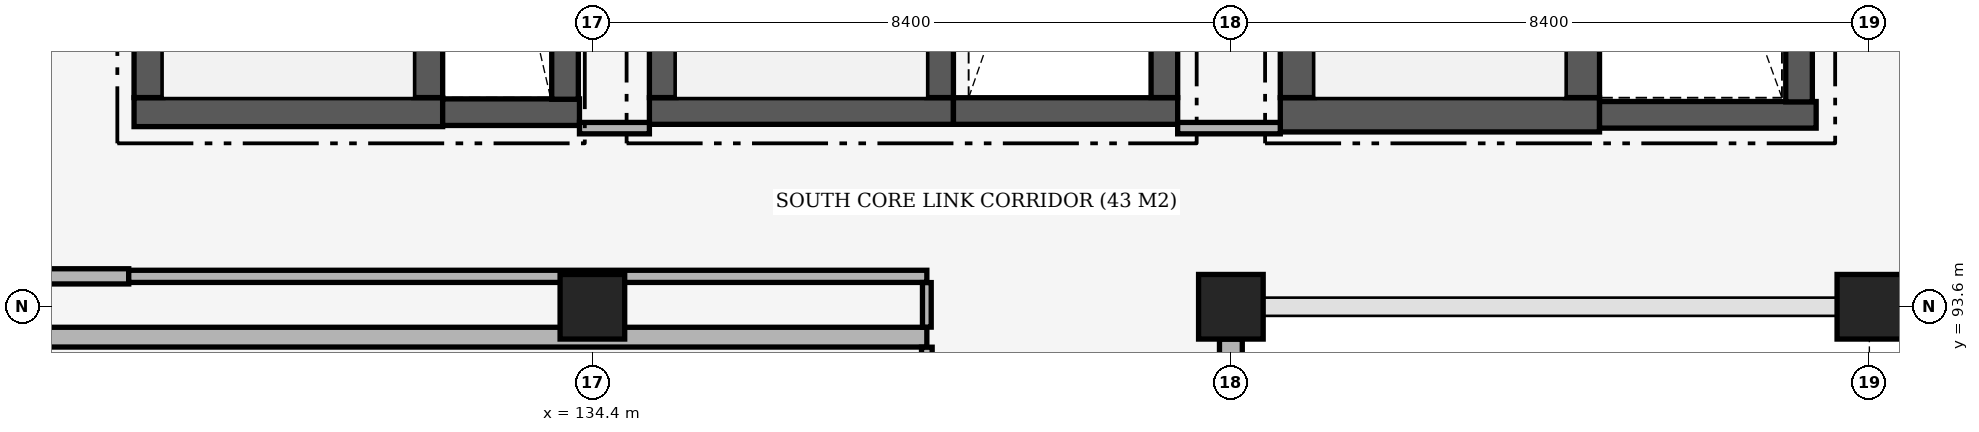
"""IFC4 building model, lengths in metres.
Left out: names, types, materials, properties, quantities, classifications, styles, units other than length and angle.
Written with IfcOpenShell. Run it as: python <this file> out.ifc"""

import sys

from ifc_helpers import new_model, si_unit, direction, frame, frame_2d, origin, origin_2d, place, context, subcontext, project, spatial, rectangle, extrude, element, save


model = new_model("IFC4")
c1 = context("Model", 3, precision=1e-05, world=origin(), true_north=direction((0.0, 1.0)))
c2 = subcontext(c1, "Body", "Model", "MODEL_VIEW")
j1 = project(units=[si_unit("LENGTHUNIT", "METRE"), si_unit("PLANEANGLEUNIT", "RADIAN")], contexts=[c1])
p1 = place(None, origin())
s1 = spatial("IfcSite", under=j1, at=p1, CompositionType="ELEMENT")
p2 = place(p1, origin())
s2 = spatial("IfcBuilding", under=s1, at=p2, CompositionType="ELEMENT")
p3 = place(p2, frame((0.0, 0.0, 5.1)))
s3 = spatial("IfcBuildingStorey", under=s2, at=p3, CompositionType="ELEMENT", Elevation=5.1)
for number, where, z_axis, x_axis in (
    (1, (134.4, 93.6, 0.0), (0.0, 0.0, 1.0), (1.0, 0.0, 0.0)),
    (2, (142.8, 93.6, 0.0), (0.0, 0.0, 1.0), (1.0, 0.0, 0.0)),
    (3, (151.2, 93.6, 0.0), (0.0, 0.0, 1.0), (1.0, 0.0, 0.0)),
):
    element("IfcColumn", number, at=place(p3, frame(where, z_axis=z_axis, x_axis=x_axis)), inside=s3, PredefinedType="COLUMN", context=c2, shape_type="SweptSolid", body=[
        extrude(rectangle(XDim=0.85, YDim=0.85, at=origin_2d()), origin(), (0.0, 0.0, 1.0), 5.1),
    ])
p4 = place(p3, frame((142.8, 93.175, 0.0), z_axis=(0.0, 0.0, 1.0), x_axis=(0.0, -1.0, 0.0)))
e4 = element("IfcWall", 4, at=p4, inside=s3, PredefinedType="SOLIDWALL", context=c2, shape_type="SweptSolid", body=[
    extrude(rectangle(XDim=7.55, YDim=0.3, at=frame_2d((3.775, 0.0))), origin(), (0.0, 0.0, 1.0), 4.02),
])
p5 = place(p4, frame((1.517, 0.0, 0.9)))
e5 = element("IfcOpeningElement", 5, at=p5, cuts=e4, PredefinedType="OPENING", context=c2, shape_type="SweptSolid", body=[
    extrude(rectangle(XDim=1.5, YDim=2.1, at=frame_2d((0.75, 1.05))), frame((0.0, 0.165, 0.0), z_axis=(0.0, -1.0, 0.0), x_axis=(1.0, 0.0, 0.0)), (0.0, 0.0, 1.0), 0.33),
])
p6 = place(p4, frame((4.533, 0.0, 0.9)))
e6 = element("IfcOpeningElement", 6, at=p6, cuts=e4, PredefinedType="OPENING", context=c2, shape_type="SweptSolid", body=[
    extrude(rectangle(XDim=1.5, YDim=2.1, at=frame_2d((0.75, 1.05))), frame((0.0, 0.165, 0.0), z_axis=(0.0, -1.0, 0.0), x_axis=(1.0, 0.0, 0.0)), (0.0, 0.0, 1.0), 0.33),
])
p7 = place(p3, frame((128.37, 96.16, 0.0), z_axis=(0.0, 0.0, 1.0), x_axis=(1.0, 0.0, 0.0)))
e7 = element("IfcWall", 7, at=p7, inside=s3, PredefinedType="SHEAR", context=c2, shape_type="SweptSolid", body=[
    extrude(rectangle(XDim=4.06, YDim=0.38, at=frame_2d((2.03, 0.0))), origin(), (0.0, 0.0, 1.0), 4.82),
])
for number, where, z_axis, x_axis in (
    (8, (128.56, 96.352, 0.0), (0.0, 0.0, 1.0), (0.0, 1.0, 0.0)),
    (9, (132.24, 96.352, 0.0), (0.0, 0.0, 1.0), (0.0, 1.0, 0.0)),
):
    element("IfcWall", number, at=place(p3, frame(where, z_axis=z_axis, x_axis=x_axis)), inside=s3, PredefinedType="SHEAR", context=c2, shape_type="SweptSolid", body=[
        extrude(rectangle(XDim=6.896, YDim=0.38, at=frame_2d((3.448, 0.0))), origin(), (0.0, 0.0, 1.0), 4.82),
    ])
p8 = place(p3, frame((132.43, 96.16, 0.0), z_axis=(0.0, 0.0, 1.0), x_axis=(1.0, 0.0, 0.0)))
e10 = element("IfcWall", 10, at=p8, inside=s3, PredefinedType="SHEAR", context=c2, shape_type="SweptSolid", body=[
    extrude(rectangle(XDim=1.8, YDim=0.35, at=frame_2d((0.9, 0.0))), origin(), (0.0, 0.0, 1.0), 4.82),
])
p9 = place(p3, frame((134.04, 96.33, 0.0), z_axis=(0.0, 0.0, 1.0), x_axis=(0.0, 1.0, 0.0)))
e11 = element("IfcWall", 11, at=p9, inside=s3, PredefinedType="SHEAR", context=c2, shape_type="SweptSolid", body=[
    extrude(rectangle(XDim=7.177, YDim=0.35, at=frame_2d((3.588, 0.0))), origin(), (0.0, 0.0, 1.0), 4.82),
])
p10 = place(p3, frame((135.15, 96.175, 0.0), z_axis=(0.0, 0.0, 1.0), x_axis=(1.0, 0.0, 0.0)))
e12 = element("IfcWall", 12, at=p10, inside=s3, PredefinedType="SHEAR", context=c2, shape_type="SweptSolid", body=[
    extrude(rectangle(XDim=4.0, YDim=0.35, at=frame_2d((2.0, 0.0))), origin(), (0.0, 0.0, 1.0), 4.82),
])
for number, where, z_axis, x_axis in (
    (13, (135.325, 96.352, 0.0), (0.0, 0.0, 1.0), (0.0, 1.0, 0.0)),
    (14, (138.975, 96.352, 0.0), (0.0, 0.0, 1.0), (0.0, 1.0, 0.0)),
):
    element("IfcWall", number, at=place(p3, frame(where, z_axis=z_axis, x_axis=x_axis)), inside=s3, PredefinedType="SHEAR", context=c2, shape_type="SweptSolid", body=[
        extrude(rectangle(XDim=6.896, YDim=0.35, at=frame_2d((3.448, 0.0))), origin(), (0.0, 0.0, 1.0), 4.82),
    ])
p11 = place(p3, frame((139.15, 96.175, 0.0), z_axis=(0.0, 0.0, 1.0), x_axis=(1.0, 0.0, 0.0)))
e15 = element("IfcWall", 15, at=p11, inside=s3, PredefinedType="SHEAR", context=c2, shape_type="SweptSolid", body=[
    extrude(rectangle(XDim=2.95, YDim=0.35, at=frame_2d((1.475, 0.0))), origin(), (0.0, 0.0, 1.0), 4.82),
])
p12 = place(p3, frame((141.925, 96.352, 0.0), z_axis=(0.0, 0.0, 1.0), x_axis=(0.0, 1.0, 0.0)))
e16 = element("IfcWall", 16, at=p12, inside=s3, PredefinedType="SHEAR", context=c2, shape_type="SweptSolid", body=[
    extrude(rectangle(XDim=7.155, YDim=0.35, at=frame_2d((3.578, 0.0))), origin(), (0.0, 0.0, 1.0), 4.82),
])
p13 = place(p3, frame((143.45, 96.125, 0.0), z_axis=(0.0, 0.0, 1.0), x_axis=(1.0, 0.0, 0.0)))
e17 = element("IfcWall", 17, at=p13, inside=s3, PredefinedType="SHEAR", context=c2, shape_type="SweptSolid", body=[
    extrude(rectangle(XDim=4.2, YDim=0.45, at=frame_2d((2.1, 0.0))), origin(), (0.0, 0.0, 1.0), 4.82),
])
for number, where, z_axis, x_axis in (
    (18, (143.675, 96.352, 0.0), (0.0, 0.0, 1.0), (0.0, 1.0, 0.0)),
    (19, (147.425, 96.352, 0.0), (0.0, 0.0, 1.0), (0.0, 1.0, 0.0)),
):
    element("IfcWall", number, at=place(p3, frame(where, z_axis=z_axis, x_axis=x_axis)), inside=s3, PredefinedType="SHEAR", context=c2, shape_type="SweptSolid", body=[
        extrude(rectangle(XDim=6.896, YDim=0.45, at=frame_2d((3.448, 0.0))), origin(), (0.0, 0.0, 1.0), 4.82),
    ])
p14 = place(p3, frame((147.65, 96.125, 0.0), z_axis=(0.0, 0.0, 1.0), x_axis=(1.0, 0.0, 0.0)))
e20 = element("IfcWall", 20, at=p14, inside=s3, PredefinedType="SHEAR", context=c2, shape_type="SweptSolid", body=[
    extrude(rectangle(XDim=2.85, YDim=0.35, at=frame_2d((1.425, 0.0))), origin(), (0.0, 0.0, 1.0), 4.82),
])
p15 = place(p3, frame((150.275, 96.295, 0.0), z_axis=(0.0, 0.0, 1.0), x_axis=(0.0, 1.0, 0.0)))
e21 = element("IfcWall", 21, at=p15, inside=s3, PredefinedType="SHEAR", context=c2, shape_type="SweptSolid", body=[
    extrude(rectangle(XDim=7.212, YDim=0.35, at=frame_2d((3.606, 0.0))), origin(), (0.0, 0.0, 1.0), 4.82),
])
p16 = place(p3, frame((126.114, 93.2, 0.0), z_axis=(0.0, 0.0, 1.0), x_axis=(1.0, 0.0, 0.0)))
e22 = element("IfcWall", 22, at=p16, inside=s3, PredefinedType="PARTITIONING", context=c2, shape_type="SweptSolid", body=[
    extrude(rectangle(XDim=12.686, YDim=0.26, at=frame_2d((6.343, 0.0))), origin(), (0.0, 0.0, 1.0), 4.02),
])
p17 = place(p3, frame((126.144, 94.0, 0.0), z_axis=(0.0, 0.0, 1.0), x_axis=(1.0, 0.0, 0.0)))
e23 = element("IfcWall", 23, at=p17, inside=s3, PredefinedType="PARTITIONING", context=c2, shape_type="SweptSolid", body=[
    extrude(rectangle(XDim=2.156, YDim=0.2, at=frame_2d((1.078, 0.0))), origin(), (0.0, 0.0, 1.0), 4.27),
])
p18 = place(p3, frame((128.3, 94.0, 0.0), z_axis=(0.0, 0.0, 1.0), x_axis=(1.0, 0.0, 0.0)))
e24 = element("IfcWall", 24, at=p18, inside=s3, PredefinedType="PARTITIONING", context=c2, shape_type="SweptSolid", body=[
    extrude(rectangle(XDim=10.5, YDim=0.16, at=frame_2d((5.25, 0.0))), origin(), (0.0, 0.0, 1.0), 4.27),
])
p19 = place(p3, frame((134.23, 95.95, 0.0), z_axis=(0.0, 0.0, 1.0), x_axis=(1.0, 0.0, 0.0)))
e25 = element("IfcWall", 25, at=p19, inside=s3, PredefinedType="PARTITIONING", context=c2, shape_type="SweptSolid", body=[
    extrude(rectangle(XDim=0.92, YDim=0.15, at=frame_2d((0.46, 0.0))), origin(), (0.0, 0.0, 1.0), 4.27),
])
p20 = place(p3, frame((142.1, 95.95, 0.0), z_axis=(0.0, 0.0, 1.0), x_axis=(1.0, 0.0, 0.0)))
e26 = element("IfcWall", 26, at=p20, inside=s3, PredefinedType="PARTITIONING", context=c2, shape_type="SweptSolid", body=[
    extrude(rectangle(XDim=1.35, YDim=0.15, at=frame_2d((0.675, 0.0))), origin(), (0.0, 0.0, 1.0), 4.27),
])
p21 = place(p3, frame((138.8, 75.032, 0.0), z_axis=(0.0, 0.0, 1.0), x_axis=(0.0, 1.0, 0.0)))
e27 = element("IfcWall", 27, at=p21, inside=s3, PredefinedType="PARTITIONING", context=c2, shape_type="SweptSolid", body=[
    extrude(rectangle(XDim=18.036, YDim=0.14, at=frame_2d((9.018, 0.0))), origin(), (0.0, 0.0, 1.0), 4.07),
])
p22 = place(p21, frame((8.518, 0.0, 0.0)))
e28 = element("IfcOpeningElement", 28, at=p22, cuts=e27, PredefinedType="OPENING", context=c2, shape_type="SweptSolid", body=[
    extrude(rectangle(XDim=1.0, YDim=2.2, at=frame_2d((0.5, 1.1))), frame((0.0, 0.085, 0.0), z_axis=(0.0, -1.0, 0.0), x_axis=(1.0, 0.0, 0.0)), (0.0, 0.0, 1.0), 0.17),
])
p23 = place(p3, frame((138.8, 93.332, 0.0), z_axis=(0.0, 0.0, 1.0), x_axis=(0.0, 1.0, 0.0)))
e29 = element("IfcWall", 29, at=p23, inside=s3, PredefinedType="PARTITIONING", context=c2, shape_type="SweptSolid", body=[
    extrude(rectangle(XDim=0.586, YDim=0.115, at=frame_2d((0.293, 0.0))), origin(), (0.0, 0.0, 1.0), 4.12),
])
save(model, sys.argv[1])
